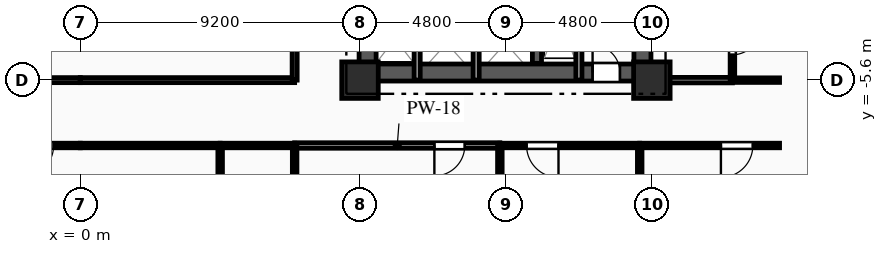
"""IFC4 building model, lengths in metres.
Left out: names, types, materials, properties, quantities, classifications, styles, units other than length and angle.
Written with IfcOpenShell. Run it as: python <this file> out.ifc"""

import sys

from ifc_helpers import new_model, si_unit, direction, frame, frame_2d, origin, origin_2d, place, context, subcontext, project, spatial, rectangle, extrude, element, fill, save


model = new_model("IFC4")
c1 = context("Model", 3, precision=1e-05, world=origin(), true_north=direction((0.0, 1.0)))
c2 = subcontext(c1, "Body", "Model", "MODEL_VIEW")
j1 = project(units=[si_unit("LENGTHUNIT", "METRE"), si_unit("PLANEANGLEUNIT", "RADIAN")], contexts=[c1])
p1 = place(None, origin())
s1 = spatial("IfcSite", under=j1, at=p1, CompositionType="ELEMENT")
p2 = place(p1, origin())
s2 = spatial("IfcBuilding", under=s1, at=p2, CompositionType="ELEMENT")
p3 = place(p2, frame((0.0, 0.0, 27.0)))
s3 = spatial("IfcBuildingStorey", under=s2, at=p3, CompositionType="ELEMENT", Elevation=27.0)
for number, where, z_axis, x_axis in (
    (1, (9.2, -5.6, 0.0), (0.0, 0.0, 1.0), (1.0, 0.0, 0.0)),
    (2, (18.8, -5.6, 0.0), (0.0, 0.0, 1.0), (1.0, 0.0, 0.0)),
):
    element("IfcColumn", number, at=place(p3, frame(where, z_axis=z_axis, x_axis=x_axis)), inside=s3, PredefinedType="COLUMN", context=c2, shape_type="SweptSolid", body=[
        extrude(rectangle(XDim=1.2, YDim=1.2, at=origin_2d()), origin(), (0.0, 0.0, 1.0), 3.35),
    ])
p4 = place(p3, frame((9.2, -5.35, 0.0), z_axis=(0.0, 0.0, 1.0), x_axis=(1.0, 0.0, 0.0)))
e3 = element("IfcWall", 3, at=p4, inside=s3, PredefinedType="SHEAR", context=c2, shape_type="SweptSolid", body=[
    extrude(rectangle(XDim=9.6, YDim=0.56, at=frame_2d((4.8, 0.0))), origin(), (0.0, 0.0, 1.0), 3.035),
])
p5 = place(p4, frame((7.65, 0.0, 0.0)))
e4 = element("IfcOpeningElement", 4, at=p5, cuts=e3, PredefinedType="OPENING", context=c2, shape_type="SweptSolid", body=[
    extrude(rectangle(XDim=0.9, YDim=2.1, at=frame_2d((0.45, 1.05))), frame((0.0, 0.29, 0.0), z_axis=(0.0, -1.0, 0.0), x_axis=(1.0, 0.0, 0.0)), (0.0, 0.0, 1.0), 0.58),
])
p6 = place(p3, frame((9.45, -5.05, 0.0), z_axis=(0.0, 0.0, 1.0), x_axis=(0.0, 1.0, 0.0)))
e5 = element("IfcWall", 5, at=p6, inside=s3, PredefinedType="SHEAR", context=c2, shape_type="SweptSolid", body=[
    extrude(rectangle(XDim=10.1, YDim=0.56, at=frame_2d((5.05, 0.0))), origin(), (0.0, 0.0, 1.0), 3.035),
])
p7 = place(p6, frame((7.15, 0.0, 0.0)))
e6 = element("IfcOpeningElement", 6, at=p7, cuts=e5, PredefinedType="OPENING", context=c2, shape_type="SweptSolid", body=[
    extrude(rectangle(XDim=0.9, YDim=2.1, at=frame_2d((0.45, 1.05))), frame((0.0, 0.29, 0.0), z_axis=(0.0, -1.0, 0.0), x_axis=(1.0, 0.0, 0.0)), (0.0, 0.0, 1.0), 0.58),
])
p8 = place(p6, frame((2.4, 0.0, 0.0)))
e7 = element("IfcOpeningElement", 7, at=p8, cuts=e5, PredefinedType="OPENING", context=c2, shape_type="SweptSolid", body=[
    extrude(rectangle(XDim=1.2, YDim=2.15, at=frame_2d((0.6, 1.075))), frame((0.0, 0.29, 0.0), z_axis=(0.0, -1.0, 0.0), x_axis=(1.0, 0.0, 0.0)), (0.0, 0.0, 1.0), 0.58),
])
p9 = place(p3, frame((18.49, -5.05, 0.0), z_axis=(0.0, 0.0, 1.0), x_axis=(0.0, 1.0, 0.0)))
e8 = element("IfcWall", 8, at=p9, inside=s3, PredefinedType="SHEAR", context=c2, shape_type="SweptSolid", body=[
    extrude(rectangle(XDim=10.1, YDim=0.56, at=frame_2d((5.05, 0.0))), origin(), (0.0, 0.0, 1.0), 3.035),
])
p10 = place(p3, frame((15.02, -5.05, 0.0), z_axis=(0.0, 0.0, 1.0), x_axis=(0.0, 1.0, 0.0)))
e9 = element("IfcWall", 9, at=p10, inside=s3, PredefinedType="SHEAR", context=c2, shape_type="SweptSolid", body=[
    extrude(rectangle(XDim=10.1, YDim=0.3, at=frame_2d((5.05, 0.0))), origin(), (0.0, 0.0, 1.0), 3.035),
])
p11 = place(p3, frame((16.4, -2.11, 0.0), z_axis=(0.0, 0.0, 1.0), x_axis=(0.0, -1.0, 0.0)))
e10 = element("IfcWall", 10, at=p11, inside=s3, PredefinedType="PARTITIONING", context=c2, shape_type="SweptSolid", body=[
    extrude(rectangle(XDim=3.49, YDim=0.2, at=frame_2d((1.745, 0.0))), origin(), (0.0, 0.0, 1.0), 3.035),
])
for number, where, z_axis, x_axis in (
    (11, (11.08, -5.6, 0.0), (0.0, 0.0, 1.0), (0.0, 1.0, 0.0)),
    (12, (13.02, -5.6, 0.0), (0.0, 0.0, 1.0), (0.0, 1.0, 0.0)),
):
    element("IfcWall", number, at=place(p3, frame(where, z_axis=z_axis, x_axis=x_axis)), inside=s3, PredefinedType="PARTITIONING", context=c2, shape_type="SweptSolid", body=[
        extrude(rectangle(XDim=2.25, YDim=0.2, at=frame_2d((1.125, 0.0))), origin(), (0.0, 0.0, 1.0), 3.035),
    ])
p12 = place(p3, frame((0.0, -7.75, 0.0), z_axis=(0.0, 0.0, 1.0), x_axis=(-1.0, 0.0, 0.0)))
e13 = element("IfcWall", 13, at=p12, inside=s3, PredefinedType="PARTITIONING", context=c2, shape_type="SweptSolid", body=[
    extrude(rectangle(XDim=4.6, YDim=0.15, at=frame_2d((2.3, 0.0))), origin(), (0.0, 0.0, 1.0), 3.035),
])
p13 = place(p12, frame((0.879, 0.0, 0.0)))
e14 = element("IfcOpeningElement", 14, at=p13, cuts=e13, PredefinedType="OPENING", context=c2, shape_type="SweptSolid", body=[
    extrude(rectangle(XDim=1.05, YDim=2.15, at=frame_2d((0.525, 1.075))), frame((0.0, 0.085, 0.0), z_axis=(0.0, -1.0, 0.0), x_axis=(1.0, 0.0, 0.0)), (0.0, 0.0, 1.0), 0.17),
])
p14 = place(p3, frame((-7.05, -5.6, 0.0), z_axis=(0.0, 0.0, 1.0), x_axis=(1.0, 0.0, 0.0)))
e15 = element("IfcWall", 15, at=p14, inside=s3, PredefinedType="PARTITIONING", context=c2, shape_type="SweptSolid", body=[
    extrude(rectangle(XDim=7.05, YDim=0.165, at=frame_2d((3.525, 0.0))), origin(), (0.0, 0.0, 1.0), 2.52),
])
p15 = place(p14, frame((4.728, 0.0, 0.0)))
e16 = element("IfcOpeningElement", 16, at=p15, cuts=e15, PredefinedType="OPENING", context=c2, shape_type="SweptSolid", body=[
    extrude(rectangle(XDim=1.15, YDim=2.15, at=frame_2d((0.575, 1.075))), frame((0.0, 0.093, 0.0), z_axis=(0.0, -1.0, 0.0), x_axis=(1.0, 0.0, 0.0)), (0.0, 0.0, 1.0), 0.185),
])
p16 = place(p3, frame((18.8, -5.6, 0.0), z_axis=(0.0, 0.0, 1.0), x_axis=(1.0, 0.0, 0.0)))
e17 = element("IfcWall", 17, at=p16, inside=s3, PredefinedType="PARTITIONING", context=c2, shape_type="SweptSolid", body=[
    extrude(rectangle(XDim=2.65, YDim=0.18, at=frame_2d((1.325, 0.0))), origin(), (0.0, 0.0, 1.0), 3.035),
])
p17 = place(p3, frame((21.45, -5.6, 0.0), z_axis=(0.0, 0.0, 1.0), x_axis=(1.0, 0.0, 0.0)))
e18 = element("IfcWall", 18, at=p17, inside=s3, PredefinedType="PLUMBINGWALL", context=c2, shape_type="SweptSolid", body=[
    extrude(rectangle(XDim=1.55, YDim=0.15, at=frame_2d((0.775, 0.0))), origin(), (0.0, 0.0, 1.0), 3.035),
])
p18 = place(p3, frame((4.6, -7.75, 0.0), z_axis=(0.0, 0.0, 1.0), x_axis=(-1.0, 0.0, 0.0)))
e19 = element("IfcWall", 19, at=p18, inside=s3, PredefinedType="PARTITIONING", context=c2, shape_type="SweptSolid", body=[
    extrude(rectangle(XDim=4.6, YDim=0.15, at=frame_2d((2.3, 0.0))), origin(), (0.0, 0.0, 1.0), 3.035),
])
p19 = place(p3, frame((13.8, -7.75, 0.0), z_axis=(0.0, 0.0, 1.0), x_axis=(-1.0, 0.0, 0.0)))
e20 = element("IfcWall", 20, at=p19, inside=s3, PredefinedType="PARTITIONING", context=c2, shape_type="SweptSolid", body=[
    extrude(rectangle(XDim=6.75, YDim=0.18, at=frame_2d((3.375, 0.0))), origin(), (0.0, 0.0, 1.0), 3.035),
])
p20 = place(p19, frame((1.154, 0.0, 0.0)))
e21 = element("IfcOpeningElement", 21, at=p20, cuts=e20, PredefinedType="OPENING", context=c2, shape_type="SweptSolid", body=[
    extrude(rectangle(XDim=1.0, YDim=2.15, at=frame_2d((0.5, 1.075))), frame((0.0, 0.1, 0.0), z_axis=(0.0, -1.0, 0.0), x_axis=(1.0, 0.0, 0.0)), (0.0, 0.0, 1.0), 0.2),
])
p21 = place(p3, frame((7.05, -7.75, 0.0), z_axis=(0.0, 0.0, 1.0), x_axis=(-1.0, 0.0, 0.0)))
e22 = element("IfcWall", 22, at=p21, inside=s3, PredefinedType="PLUMBINGWALL", context=c2, shape_type="SweptSolid", body=[
    extrude(rectangle(XDim=2.45, YDim=0.15, at=frame_2d((1.225, 0.0))), origin(), (0.0, 0.0, 1.0), 3.035),
])
p22 = place(p3, frame((18.4, -7.75, 0.0), z_axis=(0.0, 0.0, 1.0), x_axis=(-1.0, 0.0, 0.0)))
e23 = element("IfcWall", 23, at=p22, inside=s3, PredefinedType="PARTITIONING", context=c2, shape_type="SweptSolid", body=[
    extrude(rectangle(XDim=4.6, YDim=0.15, at=frame_2d((2.3, 0.0))), origin(), (0.0, 0.0, 1.0), 3.035),
])
p23 = place(p22, frame((2.671, 0.0, 0.0)))
e24 = element("IfcOpeningElement", 24, at=p23, cuts=e23, PredefinedType="OPENING", context=c2, shape_type="SweptSolid", body=[
    extrude(rectangle(XDim=1.05, YDim=2.15, at=frame_2d((0.525, 1.075))), frame((0.0, 0.085, 0.0), z_axis=(0.0, -1.0, 0.0), x_axis=(1.0, 0.0, 0.0)), (0.0, 0.0, 1.0), 0.17),
])
p24 = place(p3, frame((23.0, -7.75, 0.0), z_axis=(0.0, 0.0, 1.0), x_axis=(-1.0, 0.0, 0.0)))
e25 = element("IfcWall", 25, at=p24, inside=s3, PredefinedType="PARTITIONING", context=c2, shape_type="SweptSolid", body=[
    extrude(rectangle(XDim=4.6, YDim=0.15, at=frame_2d((2.3, 0.0))), origin(), (0.0, 0.0, 1.0), 3.035),
])
p25 = place(p24, frame((0.879, 0.0, 0.0)))
e26 = element("IfcOpeningElement", 26, at=p25, cuts=e25, PredefinedType="OPENING", context=c2, shape_type="SweptSolid", body=[
    extrude(rectangle(XDim=1.05, YDim=2.15, at=frame_2d((0.525, 1.075))), frame((0.0, 0.085, 0.0), z_axis=(0.0, -1.0, 0.0), x_axis=(1.0, 0.0, 0.0)), (0.0, 0.0, 1.0), 0.17),
])
p26 = place(p3, frame((0.0, -5.6, 0.0), z_axis=(0.0, 0.0, 1.0), x_axis=(1.0, 0.0, 0.0)))
e27 = element("IfcWall", 27, at=p26, inside=s3, PredefinedType="PARTITIONING", context=c2, shape_type="SweptSolid", body=[
    extrude(rectangle(XDim=7.05, YDim=0.165, at=frame_2d((3.525, 0.0))), origin(), (0.0, 0.0, 1.0), 2.52),
])
p27 = place(p3, frame((7.05, -5.6, 0.0), z_axis=(0.0, 0.0, 1.0), x_axis=(0.0, 1.0, 0.0)))
e28 = element("IfcWall", 28, at=p27, inside=s3, PredefinedType="PARTITIONING", context=c2, shape_type="SweptSolid", body=[
    extrude(rectangle(XDim=7.05, YDim=0.165, at=frame_2d((3.525, 0.0))), origin(), (0.0, 0.0, 1.0), 3.035),
])
p28 = place(p3, frame((21.45, -3.25, 0.0), z_axis=(0.0, 0.0, 1.0), x_axis=(0.0, -1.0, 0.0)))
e29 = element("IfcWall", 29, at=p28, inside=s3, PredefinedType="PLUMBINGWALL", context=c2, shape_type="SweptSolid", body=[
    extrude(rectangle(XDim=2.35, YDim=0.15, at=frame_2d((1.175, 0.0))), origin(), (0.0, 0.0, 1.0), 3.035),
])
p29 = place(p28, frame((0.616, 0.0, 0.0)))
e30 = element("IfcOpeningElement", 30, at=p29, cuts=e29, PredefinedType="OPENING", context=c2, shape_type="SweptSolid", body=[
    extrude(rectangle(XDim=0.9, YDim=2.1, at=frame_2d((0.45, 1.05))), frame((0.0, 0.085, 0.0), z_axis=(0.0, -1.0, 0.0), x_axis=(1.0, 0.0, 0.0)), (0.0, 0.0, 1.0), 0.17),
])
for number, where, z_axis, x_axis in (
    (31, (4.6, -7.75, 0.0), (0.0, 0.0, 1.0), (0.0, -1.0, 0.0)),
    (32, (7.05, -9.9, 0.0), (0.0, 0.0, 1.0), (0.0, 1.0, 0.0)),
):
    element("IfcWall", number, at=place(p3, frame(where, z_axis=z_axis, x_axis=x_axis)), inside=s3, PredefinedType="PLUMBINGWALL", context=c2, shape_type="SweptSolid", body=[
        extrude(rectangle(XDim=2.15, YDim=0.15, at=frame_2d((1.075, 0.0))), origin(), (0.0, 0.0, 1.0), 3.035),
    ])
for number, where, z_axis, x_axis in (
    (33, (13.8, -7.75, 0.0), (0.0, 0.0, 1.0), (0.0, -1.0, 0.0)),
    (34, (18.4, -7.75, 0.0), (0.0, 0.0, 1.0), (0.0, -1.0, 0.0)),
):
    element("IfcWall", number, at=place(p3, frame(where, z_axis=z_axis, x_axis=x_axis)), inside=s3, PredefinedType="PARTITIONING", context=c2, shape_type="SweptSolid", body=[
        extrude(rectangle(XDim=11.65, YDim=0.15, at=frame_2d((5.825, 0.0))), origin(), (0.0, 0.0, 1.0), 3.035),
    ])
p30 = place(p5, origin())
e35 = element("IfcDoor", 35, at=p30, inside=s3, OperationType="SINGLE_SWING_LEFT", PredefinedType="DOOR", context=c2, shape_type="SweptSolid", body=[
    extrude(rectangle(XDim=0.9, YDim=2.1, at=frame_2d((0.45, 1.05))), frame((0.0, 0.025, 0.0), z_axis=(0.0, -1.0, 0.0), x_axis=(1.0, 0.0, 0.0)), (0.0, 0.0, 1.0), 0.05),
])
fill(e4, e35)
p31 = place(p13, origin())
e36 = element("IfcDoor", 36, at=p31, inside=s3, OperationType="SINGLE_SWING_RIGHT", PredefinedType="DOOR", context=c2, shape_type="SweptSolid", body=[
    extrude(rectangle(XDim=1.05, YDim=2.15, at=frame_2d((0.525, 1.075))), frame((0.0, 0.025, 0.0), z_axis=(0.0, -1.0, 0.0), x_axis=(1.0, 0.0, 0.0)), (0.0, 0.0, 1.0), 0.05),
])
fill(e14, e36)
p32 = place(p20, origin())
e37 = element("IfcDoor", 37, at=p32, inside=s3, OperationType="SINGLE_SWING_RIGHT", PredefinedType="DOOR", context=c2, shape_type="SweptSolid", body=[
    extrude(rectangle(XDim=1.0, YDim=2.15, at=frame_2d((0.5, 1.075))), frame((0.0, 0.025, 0.0), z_axis=(0.0, -1.0, 0.0), x_axis=(1.0, 0.0, 0.0)), (0.0, 0.0, 1.0), 0.05),
])
fill(e21, e37)
p33 = place(p23, origin())
e38 = element("IfcDoor", 38, at=p33, inside=s3, OperationType="SINGLE_SWING_LEFT", PredefinedType="DOOR", context=c2, shape_type="SweptSolid", body=[
    extrude(rectangle(XDim=1.05, YDim=2.15, at=frame_2d((0.525, 1.075))), frame((0.0, 0.025, 0.0), z_axis=(0.0, -1.0, 0.0), x_axis=(1.0, 0.0, 0.0)), (0.0, 0.0, 1.0), 0.05),
])
fill(e24, e38)
p34 = place(p25, origin())
e39 = element("IfcDoor", 39, at=p34, inside=s3, OperationType="SINGLE_SWING_RIGHT", PredefinedType="DOOR", context=c2, shape_type="SweptSolid", body=[
    extrude(rectangle(XDim=1.05, YDim=2.15, at=frame_2d((0.525, 1.075))), frame((0.0, 0.025, 0.0), z_axis=(0.0, -1.0, 0.0), x_axis=(1.0, 0.0, 0.0)), (0.0, 0.0, 1.0), 0.05),
])
fill(e26, e39)
p35 = place(p29, origin())
e40 = element("IfcDoor", 40, at=p35, inside=s3, OperationType="SINGLE_SWING_LEFT", PredefinedType="DOOR", context=c2, shape_type="SweptSolid", body=[
    extrude(rectangle(XDim=0.9, YDim=2.1, at=frame_2d((0.45, 1.05))), frame((0.0, 0.025, 0.0), z_axis=(0.0, -1.0, 0.0), x_axis=(1.0, 0.0, 0.0)), (0.0, 0.0, 1.0), 0.05),
])
fill(e30, e40)
save(model, sys.argv[1])
